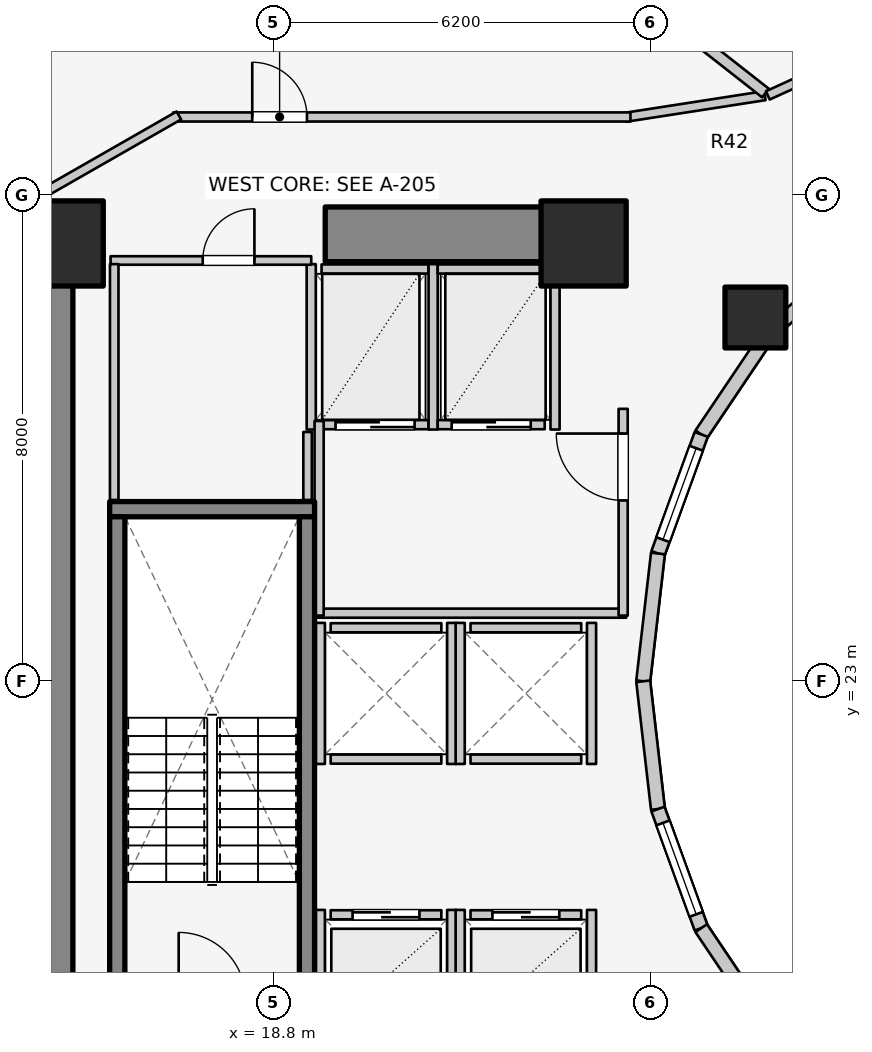
"""IFC4 building model, lengths in metres.
Left out: names, types, materials, properties, quantities, classifications, styles, units other than length and angle.
Written with IfcOpenShell. Run it as: python <this file> out.ifc"""

import sys

from ifc_helpers import new_model, si_unit, direction, frame, frame_2d, origin, origin_2d, place, context, subcontext, project, spatial, rectangle, extrude, element, fill, save


model = new_model("IFC4")
c1 = context("Model", 3, precision=1e-05, world=origin(), true_north=direction((0.0, 1.0)))
c2 = subcontext(c1, "Body", "Model", "MODEL_VIEW")
j1 = project(units=[si_unit("LENGTHUNIT", "METRE"), si_unit("PLANEANGLEUNIT", "RADIAN")], contexts=[c1])
p1 = place(None, origin())
s1 = spatial("IfcSite", under=j1, at=p1, CompositionType="ELEMENT")
p2 = place(p1, origin())
s2 = spatial("IfcBuilding", under=s1, at=p2, CompositionType="ELEMENT")
p3 = place(p2, frame((0.0, 0.0, 40.0)))
s3 = spatial("IfcBuildingStorey", under=s2, at=p3, CompositionType="ELEMENT", Elevation=40.0)
p4 = place(p3, frame((15.05, 17.05, 0.0), z_axis=(0.0, 0.0, 1.0), x_axis=(0.0, 1.0, 0.0)))
e1 = element("IfcWall", 1, at=p4, inside=s3, PredefinedType="SHEAR", context=c2, shape_type="SweptSolid", body=[
    extrude(rectangle(XDim=12.8, YDim=0.9, at=frame_2d((6.4, 0.0))), origin(), (0.0, 0.0, 1.0), 3.1),
])
p5 = place(p3, frame((19.65, 30.35, 0.0), z_axis=(0.0, 0.0, 1.0), x_axis=(1.0, 0.0, 0.0)))
e2 = element("IfcWall", 2, at=p5, inside=s3, PredefinedType="SHEAR", context=c2, shape_type="SweptSolid", body=[
    extrude(rectangle(XDim=4.5, YDim=0.9, at=frame_2d((2.25, 0.0))), origin(), (0.0, 0.0, 1.0), 3.1),
])
p6 = place(p3, frame((16.105, 25.83, 0.0), z_axis=(0.0, 0.0, 1.0), x_axis=(1.0, 0.0, 0.0)))
e3 = element("IfcWall", 3, at=p6, inside=s3, PredefinedType="SOLIDWALL", context=c2, shape_type="SweptSolid", body=[
    extrude(rectangle(XDim=3.37, YDim=0.25, at=frame_2d((1.685, 0.0))), origin(), (0.0, 0.0, 1.0), 3.1),
])
for number, where, z_axis, x_axis in (
    (4, (16.23, 17.895, 0.0), (0.0, 0.0, 1.0), (0.0, 1.0, 0.0)),
    (5, (19.35, 17.895, 0.0), (0.0, 0.0, 1.0), (0.0, 1.0, 0.0)),
):
    element("IfcWall", number, at=place(p3, frame(where, z_axis=z_axis, x_axis=x_axis)), inside=s3, PredefinedType="SOLIDWALL", context=c2, shape_type="SweptSolid", body=[
        extrude(rectangle(XDim=7.81, YDim=0.25, at=frame_2d((3.905, 0.0))), origin(), (0.0, 0.0, 1.0), 3.1),
    ])
for number, where, z_axis, x_axis in (
    (6, (23.9, 30.2, 0.0), (0.0, 0.0, 1.0), (1.0, 0.0, 0.0)),
    (7, (15.3, 30.2, 0.0), (0.0, 0.0, 1.0), (1.0, 0.0, 0.0)),
):
    element("IfcColumn", number, at=place(p3, frame(where, z_axis=z_axis, x_axis=x_axis)), inside=s3, PredefinedType="COLUMN", context=c2, shape_type="SweptSolid", body=[
        extrude(rectangle(XDim=1.4, YDim=1.4, at=origin_2d()), origin(), (0.0, 0.0, 1.0), 3.1),
    ])
p7 = place(p3, frame((26.725, 28.982, 0.0), z_axis=(0.0, 0.0, 1.0), x_axis=(1.0, 0.0, 0.0)))
e8 = element("IfcColumn", 8, at=p7, inside=s3, PredefinedType="COLUMN", context=c2, shape_type="SweptSolid", body=[
    extrude(rectangle(XDim=1.0, YDim=1.0, at=origin_2d()), origin(), (0.0, 0.0, 1.0), 3.1),
])
p8 = place(p3, frame((28.44, 30.032, 0.0), z_axis=(0.0, 0.0, 1.0), x_axis=(-0.752576694707, -0.658504607869, 0.0)))
e9 = element("IfcWall", 9, at=p8, inside=s3, PredefinedType="STANDARD", context=c2, shape_type="SweptSolid", body=[
    extrude(rectangle(XDim=1.959, YDim=0.23, at=frame_2d((0.98, 0.0))), origin(), (0.0, 0.0, 1.0), 2.16),
])
p9 = place(p3, frame((26.965, 28.742, 0.0), z_axis=(0.0, 0.0, 1.0), x_axis=(-0.558197800898, -0.829707909492, 0.0)))
e10 = element("IfcWall", 10, at=p9, inside=s3, PredefinedType="STANDARD", context=c2, shape_type="SweptSolid", body=[
    extrude(rectangle(XDim=2.027, YDim=0.23, at=frame_2d((1.013, 0.0))), origin(), (0.0, 0.0, 1.0), 2.16),
])
p10 = place(p3, frame((25.834, 27.06, 0.0), z_axis=(0.0, 0.0, 1.0), x_axis=(-0.341423187295, -0.93990968033, 0.0)))
e11 = element("IfcWall", 11, at=p10, inside=s3, PredefinedType="STANDARD", context=c2, shape_type="SweptSolid", body=[
    extrude(rectangle(XDim=2.084, YDim=0.23, at=frame_2d((1.042, 0.0))), origin(), (0.0, 0.0, 1.0), 2.84),
])
p11 = place(p10, frame((0.242, 0.0, 0.85)))
e12 = element("IfcOpeningElement", 12, at=p11, cuts=e11, PredefinedType="OPENING", context=c2, shape_type="SweptSolid", body=[
    extrude(rectangle(XDim=1.6, YDim=1.65, at=frame_2d((0.8, 0.825))), frame((0.0, 0.125, 0.0), z_axis=(0.0, -1.0, 0.0), x_axis=(1.0, 0.0, 0.0)), (0.0, 0.0, 1.0), 0.25),
])
for number, where, z_axis, x_axis in (
    (13, (25.123, 25.102, 0.0), (0.0, 0.0, 1.0), (-0.115, -0.993, 0.0)),
    (14, (24.88, 23.0, 0.0), (0.0, 0.0, 1.0), (0.115, -0.993, 0.0)),
):
    element("IfcWall", number, at=place(p3, frame(where, z_axis=z_axis, x_axis=x_axis)), inside=s3, PredefinedType="STANDARD", context=c2, shape_type="SweptSolid", body=[
        extrude(rectangle(XDim=2.115, YDim=0.23, at=frame_2d((1.058, 0.0))), origin(), (0.0, 0.0, 1.0), 2.84),
    ])
p12 = place(p3, frame((25.123, 20.898, 0.0), z_axis=(0.0, 0.0, 1.0), x_axis=(0.341423187295, -0.93990968033, 0.0)))
e15 = element("IfcWall", 15, at=p12, inside=s3, PredefinedType="STANDARD", context=c2, shape_type="SweptSolid", body=[
    extrude(rectangle(XDim=2.084, YDim=0.23, at=frame_2d((1.042, 0.0))), origin(), (0.0, 0.0, 1.0), 2.84),
])
p13 = place(p12, frame((0.242, 0.0, 0.85)))
e16 = element("IfcOpeningElement", 16, at=p13, cuts=e15, PredefinedType="OPENING", context=c2, shape_type="SweptSolid", body=[
    extrude(rectangle(XDim=1.6, YDim=1.65, at=frame_2d((0.8, 0.825))), frame((0.0, 0.125, 0.0), z_axis=(0.0, -1.0, 0.0), x_axis=(1.0, 0.0, 0.0)), (0.0, 0.0, 1.0), 0.25),
])
p14 = place(p3, frame((25.834, 18.94, 0.0), z_axis=(0.0, 0.0, 1.0), x_axis=(0.558197800898, -0.829707909492, 0.0)))
e17 = element("IfcWall", 17, at=p14, inside=s3, PredefinedType="STANDARD", context=c2, shape_type="SweptSolid", body=[
    extrude(rectangle(XDim=2.027, YDim=0.23, at=frame_2d((1.013, 0.0))), origin(), (0.0, 0.0, 1.0), 2.16),
])
p15 = place(p3, frame((19.74, 19.16, 0.0), z_axis=(0.0, 0.0, 1.0), x_axis=(1.0, 0.0, 0.0)))
e18 = element("IfcWall", 18, at=p15, inside=s3, PredefinedType="SOLIDWALL", context=c2, shape_type="SweptSolid", body=[
    extrude(rectangle(XDim=1.82, YDim=0.15, at=frame_2d((0.91, 0.0))), origin(), (0.0, 0.0, 1.0), 2.855),
])
p16 = place(p15, frame((0.36, 0.0, 0.0)))
e19 = element("IfcOpeningElement", 19, at=p16, cuts=e18, PredefinedType="OPENING", context=c2, shape_type="SweptSolid", body=[
    extrude(rectangle(XDim=1.1, YDim=2.1, at=frame_2d((0.55, 1.05))), frame((0.0, 0.085, 0.0), z_axis=(0.0, -1.0, 0.0), x_axis=(1.0, 0.0, 0.0)), (0.0, 0.0, 1.0), 0.17),
])
p17 = place(p3, frame((19.57, 17.02, 0.0), z_axis=(0.0, 0.0, 1.0), x_axis=(0.0, 1.0, 0.0)))
e20 = element("IfcWall", 20, at=p17, inside=s3, PredefinedType="SOLIDWALL", context=c2, shape_type="SweptSolid", body=[
    extrude(rectangle(XDim=2.22, YDim=0.15, at=frame_2d((1.11, 0.0))), origin(), (0.0, 0.0, 1.0), 2.12),
])
p18 = place(p3, frame((21.73, 17.02, 0.0), z_axis=(0.0, 0.0, 1.0), x_axis=(0.0, 1.0, 0.0)))
e21 = element("IfcWall", 21, at=p18, inside=s3, PredefinedType="SOLIDWALL", context=c2, shape_type="SweptSolid", body=[
    extrude(rectangle(XDim=2.22, YDim=0.15, at=frame_2d((1.11, 0.0))), origin(), (0.0, 0.0, 1.0), 2.855),
])
p19 = place(p3, frame((22.04, 19.16, 0.0), z_axis=(0.0, 0.0, 1.0), x_axis=(1.0, 0.0, 0.0)))
e22 = element("IfcWall", 22, at=p19, inside=s3, PredefinedType="SOLIDWALL", context=c2, shape_type="SweptSolid", body=[
    extrude(rectangle(XDim=1.82, YDim=0.15, at=frame_2d((0.91, 0.0))), origin(), (0.0, 0.0, 1.0), 2.12),
])
p20 = place(p19, frame((0.36, 0.0, 0.0)))
e23 = element("IfcOpeningElement", 23, at=p20, cuts=e22, PredefinedType="OPENING", context=c2, shape_type="SweptSolid", body=[
    extrude(rectangle(XDim=1.1, YDim=2.1, at=frame_2d((0.55, 1.05))), frame((0.0, 0.085, 0.0), z_axis=(0.0, -1.0, 0.0), x_axis=(1.0, 0.0, 0.0)), (0.0, 0.0, 1.0), 0.17),
])
p21 = place(p3, frame((21.87, 17.02, 0.0), z_axis=(0.0, 0.0, 1.0), x_axis=(0.0, 1.0, 0.0)))
e24 = element("IfcWall", 24, at=p21, inside=s3, PredefinedType="SOLIDWALL", context=c2, shape_type="SweptSolid", body=[
    extrude(rectangle(XDim=2.22, YDim=0.15, at=frame_2d((1.11, 0.0))), origin(), (0.0, 0.0, 1.0), 2.855),
])
p22 = place(p3, frame((24.03, 17.02, 0.0), z_axis=(0.0, 0.0, 1.0), x_axis=(0.0, 1.0, 0.0)))
e25 = element("IfcWall", 25, at=p22, inside=s3, PredefinedType="SOLIDWALL", context=c2, shape_type="SweptSolid", body=[
    extrude(rectangle(XDim=2.22, YDim=0.15, at=frame_2d((1.11, 0.0))), origin(), (0.0, 0.0, 1.0), 2.12),
])
for number, where, z_axis, x_axis in (
    (26, (19.74, 21.72, 0.0), (0.0, 0.0, 1.0), (1.0, 0.0, 0.0)),
    (27, (19.74, 23.88, 0.0), (0.0, 0.0, 1.0), (1.0, 0.0, 0.0)),
):
    element("IfcWall", number, at=place(p3, frame(where, z_axis=z_axis, x_axis=x_axis)), inside=s3, PredefinedType="SOLIDWALL", context=c2, shape_type="SweptSolid", body=[
        extrude(rectangle(XDim=1.82, YDim=0.15, at=frame_2d((0.91, 0.0))), origin(), (0.0, 0.0, 1.0), 2.855),
    ])
for number, where, z_axis, x_axis in (
    (28, (19.57, 21.64, 0.0), (0.0, 0.0, 1.0), (0.0, 1.0, 0.0)),
    (29, (21.73, 21.64, 0.0), (0.0, 0.0, 1.0), (0.0, 1.0, 0.0)),
):
    element("IfcWall", number, at=place(p3, frame(where, z_axis=z_axis, x_axis=x_axis)), inside=s3, PredefinedType="SOLIDWALL", context=c2, shape_type="SweptSolid", body=[
        extrude(rectangle(XDim=2.32, YDim=0.15, at=frame_2d((1.16, 0.0))), origin(), (0.0, 0.0, 1.0), 2.855),
    ])
for number, where, z_axis, x_axis in (
    (30, (22.04, 21.72, 0.0), (0.0, 0.0, 1.0), (1.0, 0.0, 0.0)),
    (31, (22.04, 23.88, 0.0), (0.0, 0.0, 1.0), (1.0, 0.0, 0.0)),
):
    element("IfcWall", number, at=place(p3, frame(where, z_axis=z_axis, x_axis=x_axis)), inside=s3, PredefinedType="SOLIDWALL", context=c2, shape_type="SweptSolid", body=[
        extrude(rectangle(XDim=1.82, YDim=0.15, at=frame_2d((0.91, 0.0))), origin(), (0.0, 0.0, 1.0), 2.12),
    ])
p23 = place(p3, frame((21.87, 21.64, 0.0), z_axis=(0.0, 0.0, 1.0), x_axis=(0.0, 1.0, 0.0)))
e32 = element("IfcWall", 32, at=p23, inside=s3, PredefinedType="SOLIDWALL", context=c2, shape_type="SweptSolid", body=[
    extrude(rectangle(XDim=2.32, YDim=0.15, at=frame_2d((1.16, 0.0))), origin(), (0.0, 0.0, 1.0), 2.855),
])
p24 = place(p3, frame((24.03, 21.64, 0.0), z_axis=(0.0, 0.0, 1.0), x_axis=(0.0, 1.0, 0.0)))
e33 = element("IfcWall", 33, at=p24, inside=s3, PredefinedType="SOLIDWALL", context=c2, shape_type="SweptSolid", body=[
    extrude(rectangle(XDim=2.32, YDim=0.15, at=frame_2d((1.16, 0.0))), origin(), (0.0, 0.0, 1.0), 2.12),
])
p25 = place(p3, frame((19.59, 27.22, 0.0), z_axis=(0.0, 0.0, 1.0), x_axis=(1.0, 0.0, 0.0)))
e34 = element("IfcWall", 34, at=p25, inside=s3, PredefinedType="SOLIDWALL", context=c2, shape_type="SweptSolid", body=[
    extrude(rectangle(XDim=1.76, YDim=0.15, at=frame_2d((0.88, 0.0))), origin(), (0.0, 0.0, 1.0), 2.855),
])
p26 = place(p25, frame((0.23, 0.0, 0.0)))
e35 = element("IfcOpeningElement", 35, at=p26, cuts=e34, PredefinedType="OPENING", context=c2, shape_type="SweptSolid", body=[
    extrude(rectangle(XDim=1.3, YDim=2.1, at=frame_2d((0.65, 1.05))), frame((0.0, 0.085, 0.0), z_axis=(0.0, -1.0, 0.0), x_axis=(1.0, 0.0, 0.0)), (0.0, 0.0, 1.0), 0.17),
])
p27 = place(p3, frame((19.59, 29.78, 0.0), z_axis=(0.0, 0.0, 1.0), x_axis=(1.0, 0.0, 0.0)))
e36 = element("IfcWall", 36, at=p27, inside=s3, PredefinedType="SOLIDWALL", context=c2, shape_type="SweptSolid", body=[
    extrude(rectangle(XDim=1.76, YDim=0.15, at=frame_2d((0.88, 0.0))), origin(), (0.0, 0.0, 1.0), 2.855),
])
for number, where, z_axis, x_axis in (
    (37, (19.42, 27.14, 0.0), (0.0, 0.0, 1.0), (0.0, 1.0, 0.0)),
    (38, (21.425, 27.14, 0.0), (0.0, 0.0, 1.0), (0.0, 1.0, 0.0)),
):
    element("IfcWall", number, at=place(p3, frame(where, z_axis=z_axis, x_axis=x_axis)), inside=s3, PredefinedType="SOLIDWALL", context=c2, shape_type="SweptSolid", body=[
        extrude(rectangle(XDim=2.72, YDim=0.15, at=frame_2d((1.36, 0.0))), origin(), (0.0, 0.0, 1.0), 2.855),
    ])
p28 = place(p3, frame((21.5, 27.22, 0.0), z_axis=(0.0, 0.0, 1.0), x_axis=(1.0, 0.0, 0.0)))
e39 = element("IfcWall", 39, at=p28, inside=s3, PredefinedType="SOLIDWALL", context=c2, shape_type="SweptSolid", body=[
    extrude(rectangle(XDim=1.76, YDim=0.15, at=frame_2d((0.88, 0.0))), origin(), (0.0, 0.0, 1.0), 2.855),
])
p29 = place(p28, frame((0.23, 0.0, 0.0)))
e40 = element("IfcOpeningElement", 40, at=p29, cuts=e39, PredefinedType="OPENING", context=c2, shape_type="SweptSolid", body=[
    extrude(rectangle(XDim=1.3, YDim=2.1, at=frame_2d((0.65, 1.05))), frame((0.0, 0.085, 0.0), z_axis=(0.0, -1.0, 0.0), x_axis=(1.0, 0.0, 0.0)), (0.0, 0.0, 1.0), 0.17),
])
p30 = place(p3, frame((21.5, 29.78, 0.0), z_axis=(0.0, 0.0, 1.0), x_axis=(1.0, 0.0, 0.0)))
e41 = element("IfcWall", 41, at=p30, inside=s3, PredefinedType="SOLIDWALL", context=c2, shape_type="SweptSolid", body=[
    extrude(rectangle(XDim=1.76, YDim=0.15, at=frame_2d((0.88, 0.0))), origin(), (0.0, 0.0, 1.0), 2.855),
])
p31 = place(p3, frame((23.43, 27.14, 0.0), z_axis=(0.0, 0.0, 1.0), x_axis=(0.0, 1.0, 0.0)))
e42 = element("IfcWall", 42, at=p31, inside=s3, PredefinedType="SOLIDWALL", context=c2, shape_type="SweptSolid", body=[
    extrude(rectangle(XDim=2.72, YDim=0.15, at=frame_2d((1.36, 0.0))), origin(), (0.0, 0.0, 1.0), 2.855),
])
p32 = place(p3, frame((19.52, 24.12, 0.0), z_axis=(0.0, 0.0, 1.0), x_axis=(1.0, 0.0, 0.0)))
e43 = element("IfcWall", 43, at=p32, inside=s3, PredefinedType="PARTITIONING", context=c2, shape_type="SweptSolid", body=[
    extrude(rectangle(XDim=5.08, YDim=0.15, at=frame_2d((2.54, 0.0))), origin(), (0.0, 0.0, 1.0), 2.12),
])
p33 = place(p3, frame((19.55, 24.08, 0.0), z_axis=(0.0, 0.0, 1.0), x_axis=(0.0, 1.0, 0.0)))
e44 = element("IfcWall", 44, at=p33, inside=s3, PredefinedType="PARTITIONING", context=c2, shape_type="SweptSolid", body=[
    extrude(rectangle(XDim=3.2, YDim=0.15, at=frame_2d((1.6, 0.0))), origin(), (0.0, 0.0, 1.0), 2.855),
])
p34 = place(p3, frame((24.55, 24.08, 0.0), z_axis=(0.0, 0.0, 1.0), x_axis=(0.0, 1.0, 0.0)))
e45 = element("IfcWall", 45, at=p34, inside=s3, PredefinedType="PARTITIONING", context=c2, shape_type="SweptSolid", body=[
    extrude(rectangle(XDim=3.4, YDim=0.15, at=frame_2d((1.7, 0.0))), origin(), (0.0, 0.0, 1.0), 2.855),
])
p35 = place(p34, frame((1.894, 0.0, 0.0)))
e46 = element("IfcOpeningElement", 46, at=p35, cuts=e45, PredefinedType="OPENING", context=c2, shape_type="SweptSolid", body=[
    extrude(rectangle(XDim=1.1, YDim=2.1, at=frame_2d((0.55, 1.05))), frame((0.0, 0.085, 0.0), z_axis=(0.0, -1.0, 0.0), x_axis=(1.0, 0.0, 0.0)), (0.0, 0.0, 1.0), 0.17),
])
p36 = place(p3, frame((16.12, 29.92, 0.0), z_axis=(0.0, 0.0, 1.0), x_axis=(1.0, 0.0, 0.0)))
e47 = element("IfcWall", 47, at=p36, inside=s3, PredefinedType="PLUMBINGWALL", context=c2, shape_type="SweptSolid", body=[
    extrude(rectangle(XDim=3.3, YDim=0.14, at=frame_2d((1.65, 0.0))), origin(), (0.0, 0.0, 1.0), 2.855),
])
p37 = place(p36, frame((1.516, 0.0, 0.0)))
e48 = element("IfcOpeningElement", 48, at=p37, cuts=e47, PredefinedType="OPENING", context=c2, shape_type="SweptSolid", body=[
    extrude(rectangle(XDim=0.85, YDim=2.05, at=frame_2d((0.425, 1.025))), frame((0.0, 0.08, 0.0), z_axis=(0.0, -1.0, 0.0), x_axis=(1.0, 0.0, 0.0)), (0.0, 0.0, 1.0), 0.16),
])
p38 = place(p3, frame((16.18, 25.98, 0.0), z_axis=(0.0, 0.0, 1.0), x_axis=(0.0, 1.0, 0.0)))
e49 = element("IfcWall", 49, at=p38, inside=s3, PredefinedType="PLUMBINGWALL", context=c2, shape_type="SweptSolid", body=[
    extrude(rectangle(XDim=3.88, YDim=0.14, at=frame_2d((1.94, 0.0))), origin(), (0.0, 0.0, 1.0), 2.855),
])
p39 = place(p3, frame((19.36, 25.98, 0.0), z_axis=(0.0, 0.0, 1.0), x_axis=(0.0, 1.0, 0.0)))
e50 = element("IfcWall", 50, at=p39, inside=s3, PredefinedType="PLUMBINGWALL", context=c2, shape_type="SweptSolid", body=[
    extrude(rectangle(XDim=1.12, YDim=0.14, at=frame_2d((0.56, 0.0))), origin(), (0.0, 0.0, 1.0), 2.855),
])
p40 = place(p3, frame((26.881, 32.631, 0.0), z_axis=(0.0, 0.0, 1.0), x_axis=(-0.988184633586, -0.153268163508, 0.0)))
e51 = element("IfcWall", 51, at=p40, inside=s3, PredefinedType="PARTITIONING", context=c2, shape_type="SweptSolid", body=[
    extrude(rectangle(XDim=2.318, YDim=0.15, at=frame_2d((1.159, 0.0))), origin(), (0.0, 0.0, 1.0), 2.237),
])
p41 = place(p3, frame((17.15, 32.28, 0.0), z_axis=(0.0, 0.0, 1.0), x_axis=(1.0, 0.0, 0.0)))
e52 = element("IfcWall", 52, at=p41, inside=s3, PredefinedType="PARTITIONING", context=c2, shape_type="SweptSolid", body=[
    extrude(rectangle(XDim=7.52, YDim=0.15, at=frame_2d((3.76, 0.0))), origin(), (0.0, 0.0, 1.0), 2.237),
])
p42 = place(p41, frame((1.3, 0.0, 0.0)))
e53 = element("IfcOpeningElement", 53, at=p42, cuts=e52, PredefinedType="OPENING", context=c2, shape_type="SweptSolid", body=[
    extrude(rectangle(XDim=0.9, YDim=2.1, at=frame_2d((0.45, 1.05))), frame((0.0, 0.085, 0.0), z_axis=(0.0, -1.0, 0.0), x_axis=(1.0, 0.0, 0.0)), (0.0, 0.0, 1.0), 0.17),
])
p43 = place(p3, frame((17.243, 32.305, 0.0), z_axis=(0.0, 0.0, 1.0), x_axis=(-0.867991349648, -0.496579315857, 0.0)))
e54 = element("IfcWall", 54, at=p43, inside=s3, PredefinedType="PARTITIONING", context=c2, shape_type="SweptSolid", body=[
    extrude(rectangle(XDim=2.567, YDim=0.15, at=frame_2d((1.283, 0.0))), origin(), (0.0, 0.0, 1.0), 2.069),
])
p44 = place(p3, frame((26.892, 32.673, 0.0), z_axis=(0.0, 0.0, 1.0), x_axis=(-0.78700868866, 0.616941912966, 0.0)))
e55 = element("IfcWall", 55, at=p44, inside=s3, PredefinedType="PARTITIONING", context=c2, shape_type="SweptSolid", body=[
    extrude(rectangle(XDim=10.583, YDim=0.18, at=frame_2d((5.292, 0.0))), origin(), (0.0, 0.0, 1.0), 2.237),
])
p45 = place(p3, frame((29.385, 33.753, 0.0), z_axis=(0.0, 0.0, 1.0), x_axis=(-0.910186679378, -0.414198272186, 0.0)))
e56 = element("IfcWall", 56, at=p45, inside=s3, PredefinedType="PARTITIONING", context=c2, shape_type="SweptSolid", body=[
    extrude(rectangle(XDim=2.698, YDim=0.15, at=frame_2d((1.349, 0.0))), origin(), (0.0, 0.0, 1.0), 2.237),
])
p46 = place(p45, frame((0.874, 0.0, 0.0)))
e57 = element("IfcOpeningElement", 57, at=p46, cuts=e56, PredefinedType="OPENING", context=c2, shape_type="SweptSolid", body=[
    extrude(rectangle(XDim=0.95, YDim=2.1, at=frame_2d((0.475, 1.05))), frame((0.0, 0.085, 0.0), z_axis=(0.0, -1.0, 0.0), x_axis=(1.0, 0.0, 0.0)), (0.0, 0.0, 1.0), 0.17),
])
p47 = place(p11, origin())
e58 = element("IfcWindow", 58, at=p47, inside=s3, PartitioningType="SINGLE_PANEL", PredefinedType="WINDOW", context=c2, shape_type="SweptSolid", body=[
    extrude(rectangle(XDim=1.6, YDim=1.65, at=frame_2d((0.8, 0.825))), frame((0.0, 0.03, 0.0), z_axis=(0.0, -1.0, 0.0), x_axis=(1.0, 0.0, 0.0)), (0.0, 0.0, 1.0), 0.06),
])
fill(e12, e58)
p48 = place(p13, origin())
e59 = element("IfcWindow", 59, at=p48, inside=s3, PartitioningType="SINGLE_PANEL", PredefinedType="WINDOW", context=c2, shape_type="SweptSolid", body=[
    extrude(rectangle(XDim=1.6, YDim=1.65, at=frame_2d((0.8, 0.825))), frame((0.0, 0.03, 0.0), z_axis=(0.0, -1.0, 0.0), x_axis=(1.0, 0.0, 0.0)), (0.0, 0.0, 1.0), 0.06),
])
fill(e16, e59)
p49 = place(p16, origin())
e60 = element("IfcDoor", 60, at=p49, inside=s3, OperationType="DOUBLE_DOOR_SLIDING", PredefinedType="DOOR", context=c2, shape_type="SweptSolid", body=[
    extrude(rectangle(XDim=1.1, YDim=2.1, at=frame_2d((0.55, 1.05))), frame((0.0, 0.025, 0.0), z_axis=(0.0, -1.0, 0.0), x_axis=(1.0, 0.0, 0.0)), (0.0, 0.0, 1.0), 0.05),
])
fill(e19, e60)
p50 = place(p20, origin())
e61 = element("IfcDoor", 61, at=p50, inside=s3, OperationType="DOUBLE_DOOR_SLIDING", PredefinedType="DOOR", context=c2, shape_type="SweptSolid", body=[
    extrude(rectangle(XDim=1.1, YDim=2.1, at=frame_2d((0.55, 1.05))), frame((0.0, 0.025, 0.0), z_axis=(0.0, -1.0, 0.0), x_axis=(1.0, 0.0, 0.0)), (0.0, 0.0, 1.0), 0.05),
])
fill(e23, e61)
p51 = place(p26, origin())
e62 = element("IfcDoor", 62, at=p51, inside=s3, OperationType="DOUBLE_DOOR_SLIDING", PredefinedType="DOOR", context=c2, shape_type="SweptSolid", body=[
    extrude(rectangle(XDim=1.3, YDim=2.1, at=frame_2d((0.65, 1.05))), frame((0.0, 0.025, 0.0), z_axis=(0.0, -1.0, 0.0), x_axis=(1.0, 0.0, 0.0)), (0.0, 0.0, 1.0), 0.05),
])
fill(e35, e62)
p52 = place(p29, origin())
e63 = element("IfcDoor", 63, at=p52, inside=s3, OperationType="DOUBLE_DOOR_SLIDING", PredefinedType="DOOR", context=c2, shape_type="SweptSolid", body=[
    extrude(rectangle(XDim=1.3, YDim=2.1, at=frame_2d((0.65, 1.05))), frame((0.0, 0.025, 0.0), z_axis=(0.0, -1.0, 0.0), x_axis=(1.0, 0.0, 0.0)), (0.0, 0.0, 1.0), 0.05),
])
fill(e40, e63)
p53 = place(p35, origin())
e64 = element("IfcDoor", 64, at=p53, inside=s3, OperationType="SINGLE_SWING_RIGHT", PredefinedType="DOOR", context=c2, shape_type="SweptSolid", body=[
    extrude(rectangle(XDim=1.1, YDim=2.1, at=frame_2d((0.55, 1.05))), frame((0.0, 0.025, 0.0), z_axis=(0.0, -1.0, 0.0), x_axis=(1.0, 0.0, 0.0)), (0.0, 0.0, 1.0), 0.05),
])
fill(e46, e64)
p54 = place(p37, origin())
e65 = element("IfcDoor", 65, at=p54, inside=s3, OperationType="SINGLE_SWING_RIGHT", PredefinedType="DOOR", context=c2, shape_type="SweptSolid", body=[
    extrude(rectangle(XDim=0.85, YDim=2.05, at=frame_2d((0.425, 1.025))), frame((0.0, 0.025, 0.0), z_axis=(0.0, -1.0, 0.0), x_axis=(1.0, 0.0, 0.0)), (0.0, 0.0, 1.0), 0.05),
])
fill(e48, e65)
p55 = place(p42, origin())
e66 = element("IfcDoor", 66, at=p55, inside=s3, OperationType="SINGLE_SWING_LEFT", PredefinedType="DOOR", context=c2, shape_type="SweptSolid", body=[
    extrude(rectangle(XDim=0.9, YDim=2.1, at=frame_2d((0.45, 1.05))), frame((0.0, 0.025, 0.0), z_axis=(0.0, -1.0, 0.0), x_axis=(1.0, 0.0, 0.0)), (0.0, 0.0, 1.0), 0.05),
])
fill(e53, e66)
save(model, sys.argv[1])
